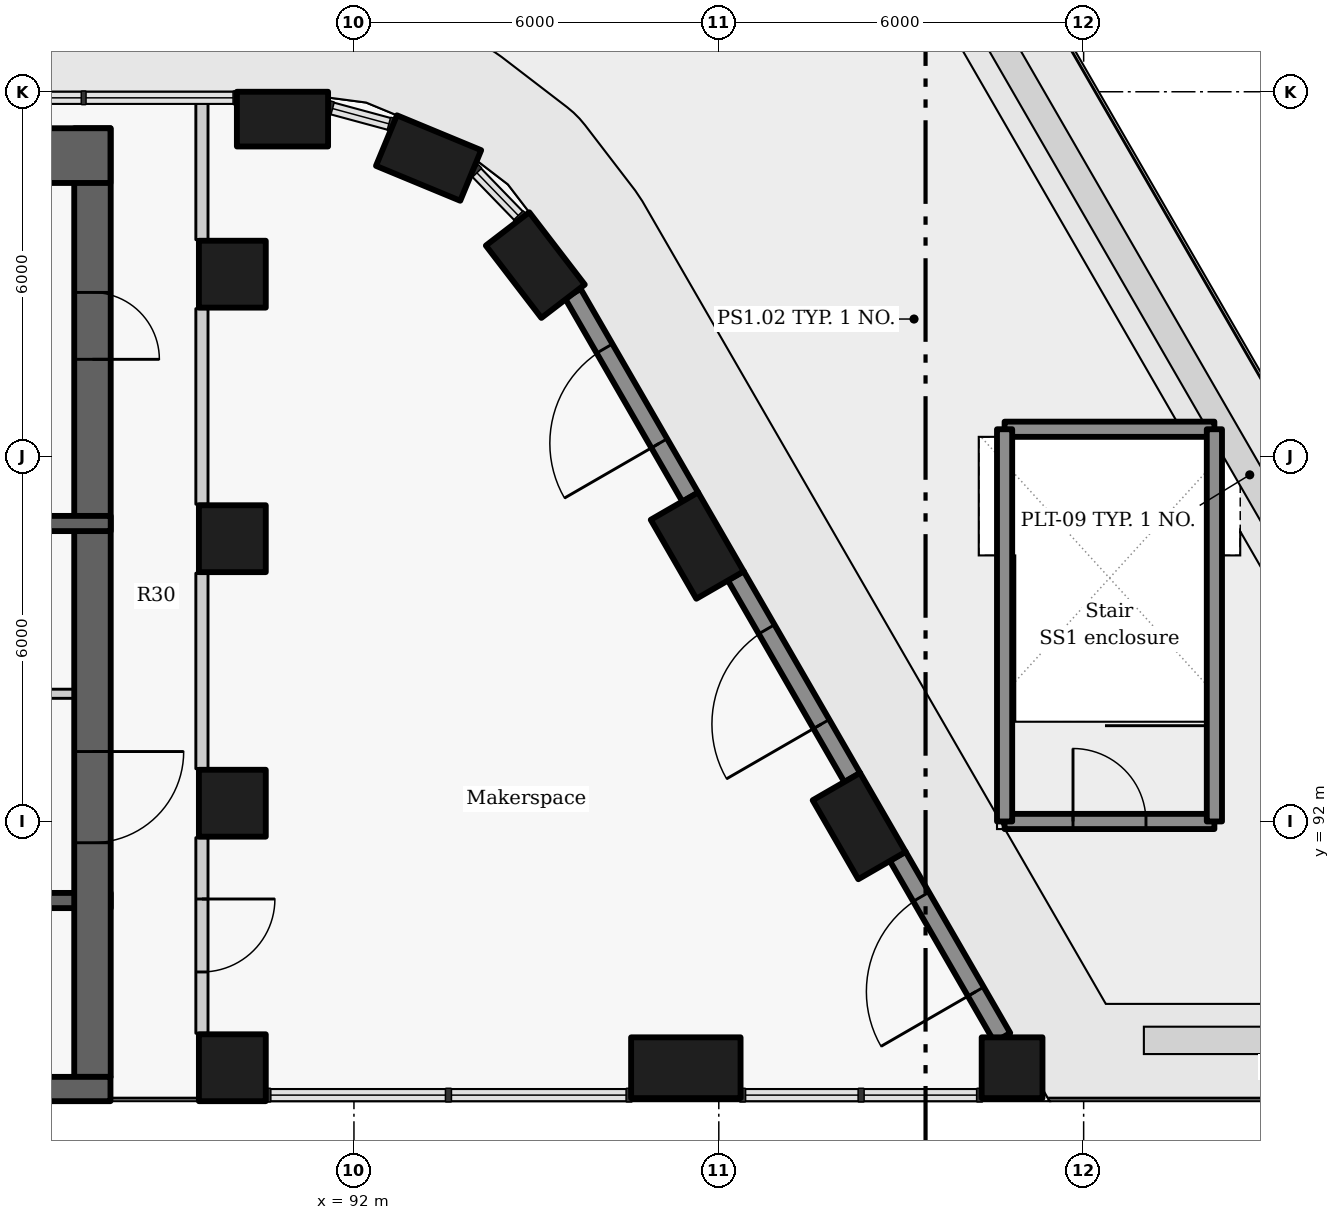
"""IFC4 building model, lengths in metres.
Left out: names, types, materials, properties, quantities, classifications, styles, units other than length and angle.
Written with IfcOpenShell. Run it as: python <this file> out.ifc"""

import sys

from ifc_helpers import new_model, si_unit, direction, frame, frame_2d, origin, origin_2d, place, context, subcontext, project, spatial, rectangle, extrude, element, fill, save


model = new_model("IFC4")
c1 = context("Model", 3, precision=1e-05, world=origin(), true_north=direction((0.0, 1.0)))
c2 = subcontext(c1, "Body", "Model", "MODEL_VIEW")
j1 = project(units=[si_unit("LENGTHUNIT", "METRE"), si_unit("PLANEANGLEUNIT", "RADIAN")], contexts=[c1])
p1 = place(None, origin())
s1 = spatial("IfcSite", under=j1, at=p1, CompositionType="ELEMENT")
p2 = place(p1, origin())
s2 = spatial("IfcBuilding", under=s1, at=p2, CompositionType="ELEMENT")
p3 = place(p2, frame((0.0, 0.0, 28.2)))
s3 = spatial("IfcBuildingStorey", under=s2, at=p3, CompositionType="ELEMENT", Elevation=28.2)
for number, where, z_axis, x_axis in (
    (1, (100.308, 91.925, 0.0), (0.0, 0.0, 1.0), (-0.5, 0.866, 0.0)),
    (2, (97.646, 96.537, 0.0), (0.0, 0.0, 1.0), (-0.5, 0.866, 0.0)),
    (3, (94.982, 101.149, 0.0), (0.0, 0.0, 1.0), (-0.609, 0.793, 0.0)),
    (4, (93.227, 102.91, 0.0), (0.0, 0.0, 1.0), (-0.924, 0.383, 0.0)),
    (5, (90.825, 103.55, 0.0), (0.0, 0.0, 1.0), (-1.0, 0.0, 0.0)),
):
    element("IfcColumn", number, at=place(p3, frame(where, z_axis=z_axis, x_axis=x_axis)), inside=s3, PredefinedType="COLUMN", context=c2, shape_type="SweptSolid", body=[
        extrude(rectangle(XDim=1.5, YDim=0.9, at=origin_2d()), origin(), (0.0, 0.0, 1.0), 3.3),
    ])
for number, where, z_axis, x_axis in (
    (6, (90.0, 87.95, 0.0), (0.0, 0.0, 1.0), (0.0, 1.0, 0.0)),
    (7, (90.0, 92.3, 0.0), (0.0, 0.0, 1.0), (0.0, 1.0, 0.0)),
    (8, (90.0, 96.65, 0.0), (0.0, 0.0, 1.0), (0.0, 1.0, 0.0)),
    (9, (90.0, 101.0, 0.0), (0.0, 0.0, 1.0), (0.0, 1.0, 0.0)),
):
    element("IfcColumn", number, at=place(p3, frame(where, z_axis=z_axis, x_axis=x_axis)), inside=s3, PredefinedType="COLUMN", context=c2, shape_type="SweptSolid", body=[
        extrude(rectangle(XDim=1.1, YDim=1.1, at=origin_2d()), origin(), (0.0, 0.0, 1.0), 3.3),
    ])
p4 = place(p3, frame((97.458, 87.95, 0.0), z_axis=(0.0, 0.0, 1.0), x_axis=(1.0, 0.0, 0.0)))
e10 = element("IfcColumn", 10, at=p4, inside=s3, PredefinedType="COLUMN", context=c2, shape_type="SweptSolid", body=[
    extrude(rectangle(XDim=1.8, YDim=1.0, at=origin_2d()), origin(), (0.0, 0.0, 1.0), 3.3),
])
p5 = place(p3, frame((102.823, 87.95, 0.0), z_axis=(0.0, 0.0, 1.0), x_axis=(1.0, 0.0, 0.0)))
e11 = element("IfcColumn", 11, at=p5, inside=s3, PredefinedType="COLUMN", context=c2, shape_type="SweptSolid", body=[
    extrude(rectangle(XDim=1.0, YDim=1.0, at=origin_2d()), origin(), (0.0, 0.0, 1.0), 3.3),
])
p6 = place(p3, frame((102.663, 88.447, 0.0), z_axis=(0.0, 0.0, 1.0), x_axis=(-0.500035437112, 0.866004943191, 0.0)))
e12 = element("IfcWall", 12, at=p6, inside=s3, PredefinedType="SOLIDWALL", context=c2, shape_type="SweptSolid", body=[
    extrude(rectangle(XDim=3.444, YDim=0.3, at=frame_2d((1.722, 0.0))), origin(), (0.0, 0.0, 1.0), 2.425),
])
p7 = place(p6, frame((0.872, 0.0, 0.0)))
e13 = element("IfcOpeningElement", 13, at=p7, cuts=e12, PredefinedType="OPENING", context=c2, shape_type="SweptSolid", body=[
    extrude(rectangle(XDim=1.8, YDim=2.0, at=frame_2d((0.9, 1.0))), frame((0.0, 0.16, 0.0), z_axis=(0.0, -1.0, 0.0), x_axis=(1.0, 0.0, 0.0)), (0.0, 0.0, 1.0), 0.32),
])
p8 = place(p3, frame((100.195, 92.721, 0.0), z_axis=(0.0, 0.0, 1.0), x_axis=(-0.500001735503, 0.866024401789, 0.0)))
e14 = element("IfcWall", 14, at=p8, inside=s3, PredefinedType="SOLIDWALL", context=c2, shape_type="SweptSolid", body=[
    extrude(rectangle(XDim=3.834, YDim=0.3, at=frame_2d((1.917, 0.0))), origin(), (0.0, 0.0, 1.0), 2.425),
])
p9 = place(p8, frame((1.017, 0.0, 0.0)))
e15 = element("IfcOpeningElement", 15, at=p9, cuts=e14, PredefinedType="OPENING", context=c2, shape_type="SweptSolid", body=[
    extrude(rectangle(XDim=1.8, YDim=2.0, at=frame_2d((0.9, 1.0))), frame((0.0, 0.16, 0.0), z_axis=(0.0, -1.0, 0.0), x_axis=(1.0, 0.0, 0.0)), (0.0, 0.0, 1.0), 0.32),
])
p10 = place(p3, frame((97.532, 97.333, 0.0), z_axis=(0.0, 0.0, 1.0), x_axis=(-0.499948341072, 0.866055227026, 0.0)))
e16 = element("IfcWall", 16, at=p10, inside=s3, PredefinedType="SOLIDWALL", context=c2, shape_type="SweptSolid", body=[
    extrude(rectangle(XDim=3.867, YDim=0.3, at=frame_2d((1.934, 0.0))), origin(), (0.0, 0.0, 1.0), 2.425),
])
p11 = place(p10, frame((1.022, 0.0, 0.0)))
e17 = element("IfcOpeningElement", 17, at=p11, cuts=e16, PredefinedType="OPENING", context=c2, shape_type="SweptSolid", body=[
    extrude(rectangle(XDim=1.8, YDim=2.0, at=frame_2d((0.9, 1.0))), frame((0.0, 0.16, 0.0), z_axis=(0.0, -1.0, 0.0), x_axis=(1.0, 0.0, 0.0)), (0.0, 0.0, 1.0), 0.32),
])
p12 = place(p3, frame((88.0, 90.7, -0.275), z_axis=(0.0, 0.0, 1.0), x_axis=(-1.0, 0.0, 0.0)))
e18 = element("IfcWall", 18, at=p12, inside=s3, PredefinedType="SHEAR", context=c2, shape_type="SweptSolid", body=[
    extrude(rectangle(XDim=2.6, YDim=0.25, at=frame_2d((1.3, 0.0))), origin(), (0.0, 0.0, 1.0), 3.3),
])
p13 = place(p12, frame((1.175, 0.0, 0.275)))
e19 = element("IfcOpeningElement", 19, at=p13, cuts=e18, PredefinedType="OPENING", context=c2, shape_type="SweptSolid", body=[
    extrude(rectangle(XDim=0.9, YDim=2.1, at=frame_2d((0.45, 1.05))), frame((0.0, 0.135, 0.0), z_axis=(0.0, -1.0, 0.0), x_axis=(1.0, 0.0, 0.0)), (0.0, 0.0, 1.0), 0.27),
])
p14 = place(p3, frame((87.7, 103.4, -0.275), z_axis=(0.0, 0.0, 1.0), x_axis=(0.0, -1.0, 0.0)))
e20 = element("IfcWall", 20, at=p14, inside=s3, PredefinedType="SHEAR", context=c2, shape_type="SweptSolid", body=[
    extrude(rectangle(XDim=15.6, YDim=0.6, at=frame_2d((7.8, 0.0))), origin(), (0.0, 0.0, 1.0), 3.3),
])
p15 = place(p14, frame((10.25, 0.0, 0.275)))
e21 = element("IfcOpeningElement", 21, at=p15, cuts=e20, PredefinedType="OPENING", context=c2, shape_type="SweptSolid", body=[
    extrude(rectangle(XDim=1.5, YDim=2.1, at=frame_2d((0.75, 1.05))), frame((0.0, 0.31, 0.0), z_axis=(0.0, -1.0, 0.0), x_axis=(1.0, 0.0, 0.0)), (0.0, 0.0, 1.0), 0.62),
])
p16 = place(p14, frame((2.7, 0.0, 0.275)))
e22 = element("IfcOpeningElement", 22, at=p16, cuts=e20, PredefinedType="OPENING", context=c2, shape_type="SweptSolid", body=[
    extrude(rectangle(XDim=1.1, YDim=2.1, at=frame_2d((0.55, 1.05))), frame((0.0, 0.31, 0.0), z_axis=(0.0, -1.0, 0.0), x_axis=(1.0, 0.0, 0.0)), (0.0, 0.0, 1.0), 0.62),
])
p17 = place(p3, frame((85.397, 94.1, 0.0), z_axis=(0.0, 0.0, 1.0), x_axis=(1.0, 0.0, 0.0)))
e23 = element("IfcWall", 23, at=p17, inside=s3, PredefinedType="PARTITIONING", context=c2, shape_type="SweptSolid", body=[
    extrude(rectangle(XDim=2.603, YDim=0.15, at=frame_2d((1.302, 0.0))), origin(), (0.0, 0.0, 1.0), 3.025),
])
p18 = place(p17, frame((0.528, 0.0, 0.0)))
e24 = element("IfcOpeningElement", 24, at=p18, cuts=e23, PredefinedType="OPENING", context=c2, shape_type="SweptSolid", body=[
    extrude(rectangle(XDim=0.9, YDim=2.1, at=frame_2d((0.45, 1.05))), frame((0.0, 0.085, 0.0), z_axis=(0.0, -1.0, 0.0), x_axis=(1.0, 0.0, 0.0)), (0.0, 0.0, 1.0), 0.17),
])
p19 = place(p3, frame((80.0, 96.9, -0.275), z_axis=(0.0, 0.0, 1.0), x_axis=(1.0, 0.0, 0.0)))
e25 = element("IfcWall", 25, at=p19, inside=s3, PredefinedType="SHEAR", context=c2, shape_type="SweptSolid", body=[
    extrude(rectangle(XDim=8.0, YDim=0.25, at=frame_2d((4.0, 0.0))), origin(), (0.0, 0.0, 1.0), 3.3),
])
p20 = place(p19, frame((3.849, 0.0, 0.275)))
e26 = element("IfcOpeningElement", 26, at=p20, cuts=e25, PredefinedType="OPENING", context=c2, shape_type="SweptSolid", body=[
    extrude(rectangle(XDim=1.1, YDim=2.1, at=frame_2d((0.55, 1.05))), frame((0.0, 0.135, 0.0), z_axis=(0.0, -1.0, 0.0), x_axis=(1.0, 0.0, 0.0)), (0.0, 0.0, 1.0), 0.27),
])
p21 = place(p3, frame((89.5, 91.733, 0.0), z_axis=(0.0, 0.0, 1.0), x_axis=(0.0, -1.0, 0.0)))
e27 = element("IfcWall", 27, at=p21, inside=s3, PredefinedType="PARTITIONING", context=c2, shape_type="SweptSolid", body=[
    extrude(rectangle(XDim=3.216, YDim=0.2, at=frame_2d((1.608, 0.0))), origin(), (0.0, 0.0, 1.0), 3.025),
])
p22 = place(p21, frame((1.008, 0.0, 0.0)))
e28 = element("IfcOpeningElement", 28, at=p22, cuts=e27, PredefinedType="OPENING", context=c2, shape_type="SweptSolid", body=[
    extrude(rectangle(XDim=1.2, YDim=2.1, at=frame_2d((0.6, 1.05))), frame((0.0, 0.11, 0.0), z_axis=(0.0, -1.0, 0.0), x_axis=(1.0, 0.0, 0.0)), (0.0, 0.0, 1.0), 0.22),
])
for number, where, z_axis, x_axis in (
    (29, (89.5, 92.867, 0.0), (0.0, 0.0, 1.0), (0.0, 1.0, 0.0)),
    (30, (89.5, 97.217, 0.0), (0.0, 0.0, 1.0), (0.0, 1.0, 0.0)),
):
    element("IfcWall", number, at=place(p3, frame(where, z_axis=z_axis, x_axis=x_axis)), inside=s3, PredefinedType="PARTITIONING", context=c2, shape_type="SweptSolid", body=[
        extrude(rectangle(XDim=3.216, YDim=0.2, at=frame_2d((1.608, 0.0))), origin(), (0.0, 0.0, 1.0), 3.025),
    ])
p23 = place(p3, frame((89.5, 101.567, 0.0), z_axis=(0.0, 0.0, 1.0), x_axis=(0.0, 1.0, 0.0)))
e31 = element("IfcWall", 31, at=p23, inside=s3, PredefinedType="PARTITIONING", context=c2, shape_type="SweptSolid", body=[
    extrude(rectangle(XDim=2.253, YDim=0.2, at=frame_2d((1.126, 0.0))), origin(), (0.0, 0.0, 1.0), 3.025),
])
p24 = place(p3, frame((72.004, 87.6, -0.275), z_axis=(0.0, 0.0, 1.0), x_axis=(1.0, 0.0, 0.0)))
e32 = element("IfcWall", 32, at=p24, inside=s3, PredefinedType="SHEAR", context=c2, shape_type="SweptSolid", body=[
    extrude(rectangle(XDim=15.992, YDim=0.4, at=frame_2d((7.996, 0.0))), origin(), (0.0, 0.0, 1.0), 3.3),
])
p25 = place(p3, frame((72.004, 102.95, -0.275), z_axis=(0.0, 0.0, 1.0), x_axis=(1.0, 0.0, 0.0)))
e33 = element("IfcWall", 33, at=p25, inside=s3, PredefinedType="SHEAR", context=c2, shape_type="SweptSolid", body=[
    extrude(rectangle(XDim=15.992, YDim=0.9, at=frame_2d((7.996, 0.0))), origin(), (0.0, 0.0, 1.0), 3.3),
])
p26 = place(p3, frame((102.7, 92.0, 0.0), z_axis=(0.0, 0.0, 1.0), x_axis=(1.0, 0.0, 0.0)))
e34 = element("IfcWall", 34, at=p26, inside=s3, PredefinedType="SHEAR", context=c2, shape_type="SweptSolid", body=[
    extrude(rectangle(XDim=3.45, YDim=0.25, at=frame_2d((1.725, 0.0))), origin(), (0.0, 0.0, 1.0), 2.5),
])
p27 = place(p26, frame((1.125, 0.0, 0.0)))
e35 = element("IfcOpeningElement", 35, at=p27, cuts=e34, PredefinedType="OPENING", context=c2, shape_type="SweptSolid", body=[
    extrude(rectangle(XDim=1.2, YDim=2.1, at=frame_2d((0.6, 1.05))), frame((0.0, 0.135, 0.0), z_axis=(0.0, -1.0, 0.0), x_axis=(1.0, 0.0, 0.0)), (0.0, 0.0, 1.0), 0.27),
])
p28 = place(p3, frame((106.15, 98.45, 0.0), z_axis=(0.0, 0.0, 1.0), x_axis=(-1.0, 0.0, 0.0)))
e36 = element("IfcWall", 36, at=p28, inside=s3, PredefinedType="SHEAR", context=c2, shape_type="SweptSolid", body=[
    extrude(rectangle(XDim=3.45, YDim=0.25, at=frame_2d((1.725, 0.0))), origin(), (0.0, 0.0, 1.0), 2.5),
])
for number, where, z_axis, x_axis in (
    (37, (106.15, 92.0, 0.0), (0.0, 0.0, 1.0), (0.0, 1.0, 0.0)),
    (38, (102.7, 98.45, 0.0), (0.0, 0.0, 1.0), (0.0, -1.0, 0.0)),
):
    element("IfcWall", number, at=place(p3, frame(where, z_axis=z_axis, x_axis=x_axis)), inside=s3, PredefinedType="SHEAR", context=c2, shape_type="SweptSolid", body=[
        extrude(rectangle(XDim=6.45, YDim=0.25, at=frame_2d((3.225, 0.0))), origin(), (0.0, 0.0, 1.0), 2.5),
    ])
p29 = place(p7, frame((1.8, 0.0, 0.0), z_axis=(0.0, 0.0, 1.0), x_axis=(-1.0, 0.0, 0.0)))
e39 = element("IfcDoor", 39, at=p29, inside=s3, OperationType="DOUBLE_DOOR_SINGLE_SWING", PredefinedType="DOOR", context=c2, shape_type="SweptSolid", body=[
    extrude(rectangle(XDim=1.8, YDim=2.0, at=frame_2d((0.9, 1.0))), frame((0.0, 0.025, 0.0), z_axis=(0.0, -1.0, 0.0), x_axis=(1.0, 0.0, 0.0)), (0.0, 0.0, 1.0), 0.05),
])
fill(e13, e39)
p30 = place(p9, frame((1.8, 0.0, 0.0), z_axis=(0.0, 0.0, 1.0), x_axis=(-1.0, 0.0, 0.0)))
e40 = element("IfcDoor", 40, at=p30, inside=s3, OperationType="DOUBLE_DOOR_SINGLE_SWING", PredefinedType="DOOR", context=c2, shape_type="SweptSolid", body=[
    extrude(rectangle(XDim=1.8, YDim=2.0, at=frame_2d((0.9, 1.0))), frame((0.0, 0.025, 0.0), z_axis=(0.0, -1.0, 0.0), x_axis=(1.0, 0.0, 0.0)), (0.0, 0.0, 1.0), 0.05),
])
fill(e15, e40)
p31 = place(p11, frame((1.8, 0.0, 0.0), z_axis=(0.0, 0.0, 1.0), x_axis=(-1.0, 0.0, 0.0)))
e41 = element("IfcDoor", 41, at=p31, inside=s3, OperationType="DOUBLE_DOOR_SINGLE_SWING", PredefinedType="DOOR", context=c2, shape_type="SweptSolid", body=[
    extrude(rectangle(XDim=1.8, YDim=2.0, at=frame_2d((0.9, 1.0))), frame((0.0, 0.025, 0.0), z_axis=(0.0, -1.0, 0.0), x_axis=(1.0, 0.0, 0.0)), (0.0, 0.0, 1.0), 0.05),
])
fill(e17, e41)
p32 = place(p22, origin())
e42 = element("IfcDoor", 42, at=p32, inside=s3, OperationType="SINGLE_SWING_LEFT", PredefinedType="DOOR", context=c2, shape_type="SweptSolid", body=[
    extrude(rectangle(XDim=1.2, YDim=2.1, at=frame_2d((0.6, 1.05))), frame((0.0, 0.025, 0.0), z_axis=(0.0, -1.0, 0.0), x_axis=(1.0, 0.0, 0.0)), (0.0, 0.0, 1.0), 0.05),
])
fill(e28, e42)
p33 = place(p15, origin())
e43 = element("IfcDoor", 43, at=p33, inside=s3, OperationType="DOUBLE_DOOR_SINGLE_SWING", PredefinedType="DOOR", context=c2, shape_type="SweptSolid", body=[
    extrude(rectangle(XDim=1.5, YDim=2.1, at=frame_2d((0.75, 1.05))), frame((0.0, 0.025, 0.0), z_axis=(0.0, -1.0, 0.0), x_axis=(1.0, 0.0, 0.0)), (0.0, 0.0, 1.0), 0.05),
])
fill(e21, e43)
p34 = place(p16, origin())
e44 = element("IfcDoor", 44, at=p34, inside=s3, OperationType="SINGLE_SWING_RIGHT", PredefinedType="DOOR", context=c2, shape_type="SweptSolid", body=[
    extrude(rectangle(XDim=1.1, YDim=2.1, at=frame_2d((0.55, 1.05))), frame((0.0, 0.025, 0.0), z_axis=(0.0, -1.0, 0.0), x_axis=(1.0, 0.0, 0.0)), (0.0, 0.0, 1.0), 0.05),
])
fill(e22, e44)
p35 = place(p27, origin())
e45 = element("IfcDoor", 45, at=p35, inside=s3, OperationType="DOUBLE_DOOR_SINGLE_SWING", PredefinedType="DOOR", context=c2, shape_type="SweptSolid", body=[
    extrude(rectangle(XDim=1.2, YDim=2.1, at=frame_2d((0.6, 1.05))), frame((0.0, 0.025, 0.0), z_axis=(0.0, -1.0, 0.0), x_axis=(1.0, 0.0, 0.0)), (0.0, 0.0, 1.0), 0.05),
])
fill(e35, e45)
save(model, sys.argv[1])
